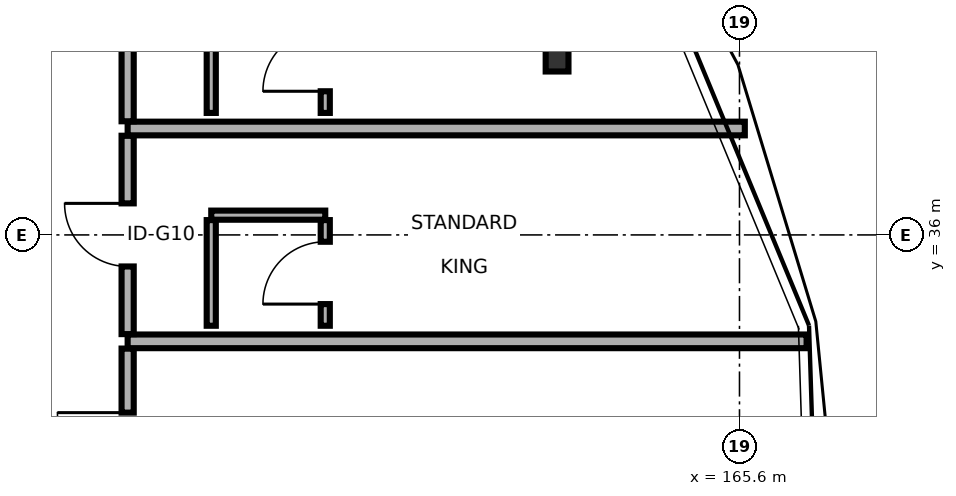
"""IFC4 building model, lengths in metres.
Left out: names, types, materials, properties, quantities, classifications, styles, units other than length and angle.
Written with IfcOpenShell. Run it as: python <this file> out.ifc"""

import sys

from ifc_helpers import new_model, si_unit, direction, frame, frame_2d, origin, origin_2d, place, context, subcontext, project, spatial, rectangle, i_section, extrude, element, fill, save


model = new_model("IFC4")
c1 = context("Model", 3, precision=1e-05, world=origin(), true_north=direction((0.0, 1.0)))
c2 = subcontext(c1, "Body", "Model", "MODEL_VIEW")
j1 = project(units=[si_unit("LENGTHUNIT", "METRE"), si_unit("PLANEANGLEUNIT", "RADIAN")], contexts=[c1])
p1 = place(None, origin())
s1 = spatial("IfcSite", under=j1, at=p1, CompositionType="ELEMENT")
p2 = place(p1, origin())
s2 = spatial("IfcBuilding", under=s1, at=p2, CompositionType="ELEMENT")
p3 = place(p2, frame((0.0, 0.0, 24.9)))
s3 = spatial("IfcBuildingStorey", under=s2, at=p3, CompositionType="ELEMENT", Elevation=24.9)
p4 = place(p3, frame((163.2, 38.4, 0.0), z_axis=(0.0, 0.0, 1.0), x_axis=(1.0, 0.0, 0.0)))
e1 = element("IfcColumn", 1, at=p4, inside=s3, PredefinedType="COLUMN", context=c2, shape_type="SweptSolid", body=[
    extrude(i_section(OverallWidth=0.3, OverallDepth=0.5, WebThickness=0.014, FlangeThickness=0.028, FilletRadius=0.027, at=origin_2d()), origin(), (0.0, 0.0, 1.0), 3.4),
])
p5 = place(p3, frame((157.55, 31.895, 0.0), z_axis=(0.0, 0.0, 1.0), x_axis=(0.0, 1.0, 0.0)))
e2 = element("IfcWall", 2, at=p5, inside=s3, PredefinedType="PARTITIONING", context=c2, shape_type="SweptSolid", body=[
    extrude(rectangle(XDim=2.61, YDim=0.16, at=frame_2d((1.305, 0.0))), origin(), (0.0, 0.0, 1.0), 3.19),
])
p6 = place(p5, frame((0.843, 0.0, 0.0)))
e3 = element("IfcOpeningElement", 3, at=p6, cuts=e2, PredefinedType="OPENING", context=c2, shape_type="SweptSolid", body=[
    extrude(rectangle(XDim=0.924, YDim=2.16, at=frame_2d((0.462, 1.08))), frame((0.0, 0.09, 0.0), z_axis=(0.0, -1.0, 0.0), x_axis=(1.0, 0.0, 0.0)), (0.0, 0.0, 1.0), 0.18),
])
p7 = place(p3, frame((157.55, 34.6, 0.0), z_axis=(0.0, 0.0, 1.0), x_axis=(1.0, 0.0, 0.0)))
e4 = element("IfcWall", 4, at=p7, inside=s3, PredefinedType="PARTITIONING", context=c2, shape_type="SweptSolid", body=[
    extrude(rectangle(XDim=8.933, YDim=0.18, at=frame_2d((4.466, 0.0))), origin(), (0.0, 0.0, 1.0), 2.675),
])
p8 = place(p3, frame((157.55, 34.695, 0.0), z_axis=(0.0, 0.0, 1.0), x_axis=(0.0, 1.0, 0.0)))
e5 = element("IfcWall", 5, at=p8, inside=s3, PredefinedType="PARTITIONING", context=c2, shape_type="SweptSolid", body=[
    extrude(rectangle(XDim=2.61, YDim=0.16, at=frame_2d((1.305, 0.0))), origin(), (0.0, 0.0, 1.0), 3.19),
])
p9 = place(p8, frame((0.89, 0.0, 0.0)))
e6 = element("IfcOpeningElement", 6, at=p9, cuts=e5, PredefinedType="OPENING", context=c2, shape_type="SweptSolid", body=[
    extrude(rectangle(XDim=0.83, YDim=2.11, at=frame_2d((0.415, 1.055))), frame((0.0, 0.09, 0.0), z_axis=(0.0, -1.0, 0.0), x_axis=(1.0, 0.0, 0.0)), (0.0, 0.0, 1.0), 0.18),
])
p10 = place(p3, frame((158.65, 36.26, 0.0), z_axis=(0.0, 0.0, 1.0), x_axis=(1.0, 0.0, 0.0)))
e7 = element("IfcWall", 7, at=p10, inside=s3, PredefinedType="PARTITIONING", context=c2, shape_type="SweptSolid", body=[
    extrude(rectangle(XDim=1.5, YDim=0.12, at=frame_2d((0.75, 0.0))), origin(), (0.0, 0.0, 1.0), 3.19),
])
p11 = place(p3, frame((158.65, 34.805, 0.0), z_axis=(0.0, 0.0, 1.0), x_axis=(0.0, 1.0, 0.0)))
e8 = element("IfcWall", 8, at=p11, inside=s3, PredefinedType="PARTITIONING", context=c2, shape_type="SweptSolid", body=[
    extrude(rectangle(XDim=1.39, YDim=0.12, at=frame_2d((0.695, 0.0))), origin(), (0.0, 0.0, 1.0), 3.19),
])
p12 = place(p3, frame((160.15, 34.805, 0.0), z_axis=(0.0, 0.0, 1.0), x_axis=(0.0, 1.0, 0.0)))
e9 = element("IfcWall", 9, at=p12, inside=s3, PredefinedType="PARTITIONING", context=c2, shape_type="SweptSolid", body=[
    extrude(rectangle(XDim=1.39, YDim=0.12, at=frame_2d((0.695, 0.0))), origin(), (0.0, 0.0, 1.0), 3.19),
])
p13 = place(p12, frame((0.285, 0.0, 0.0)))
e10 = element("IfcOpeningElement", 10, at=p13, cuts=e9, PredefinedType="OPENING", context=c2, shape_type="SweptSolid", body=[
    extrude(rectangle(XDim=0.82, YDim=2.08, at=frame_2d((0.41, 1.04))), frame((0.0, 0.07, 0.0), z_axis=(0.0, -1.0, 0.0), x_axis=(1.0, 0.0, 0.0)), (0.0, 0.0, 1.0), 0.14),
])
p14 = place(p3, frame((157.55, 37.4, 0.0), z_axis=(0.0, 0.0, 1.0), x_axis=(1.0, 0.0, 0.0)))
e11 = element("IfcWall", 11, at=p14, inside=s3, PredefinedType="PARTITIONING", context=c2, shape_type="SweptSolid", body=[
    extrude(rectangle(XDim=8.12, YDim=0.18, at=frame_2d((4.06, 0.0))), origin(), (0.0, 0.0, 1.0), 2.675),
])
p15 = place(p3, frame((157.55, 37.495, 0.0), z_axis=(0.0, 0.0, 1.0), x_axis=(0.0, 1.0, 0.0)))
e12 = element("IfcWall", 12, at=p15, inside=s3, PredefinedType="PARTITIONING", context=c2, shape_type="SweptSolid", body=[
    extrude(rectangle(XDim=2.61, YDim=0.16, at=frame_2d((1.305, 0.0))), origin(), (0.0, 0.0, 1.0), 2.725),
])
p16 = place(p15, frame((1.595, 0.0, 0.0)))
e13 = element("IfcOpeningElement", 13, at=p16, cuts=e12, PredefinedType="OPENING", context=c2, shape_type="SweptSolid", body=[
    extrude(rectangle(XDim=0.855, YDim=2.11, at=frame_2d((0.427, 1.055))), frame((0.0, 0.09, 0.0), z_axis=(0.0, -1.0, 0.0), x_axis=(1.0, 0.0, 0.0)), (0.0, 0.0, 1.0), 0.18),
])
p17 = place(p3, frame((158.65, 37.605, 0.0), z_axis=(0.0, 0.0, 1.0), x_axis=(0.0, 1.0, 0.0)))
e14 = element("IfcWall", 14, at=p17, inside=s3, PredefinedType="PARTITIONING", context=c2, shape_type="SweptSolid", body=[
    extrude(rectangle(XDim=1.39, YDim=0.12, at=frame_2d((0.695, 0.0))), origin(), (0.0, 0.0, 1.0), 2.725),
])
p18 = place(p3, frame((160.15, 37.605, 0.0), z_axis=(0.0, 0.0, 1.0), x_axis=(0.0, 1.0, 0.0)))
e15 = element("IfcWall", 15, at=p18, inside=s3, PredefinedType="PARTITIONING", context=c2, shape_type="SweptSolid", body=[
    extrude(rectangle(XDim=1.39, YDim=0.12, at=frame_2d((0.695, 0.0))), origin(), (0.0, 0.0, 1.0), 2.725),
])
p19 = place(p18, frame((0.285, 0.0, 0.0)))
e16 = element("IfcOpeningElement", 16, at=p19, cuts=e15, PredefinedType="OPENING", context=c2, shape_type="SweptSolid", body=[
    extrude(rectangle(XDim=0.82, YDim=2.08, at=frame_2d((0.41, 1.04))), frame((0.0, 0.07, 0.0), z_axis=(0.0, -1.0, 0.0), x_axis=(1.0, 0.0, 0.0)), (0.0, 0.0, 1.0), 0.14),
])
p20 = place(p6, origin())
e17 = element("IfcDoor", 17, at=p20, inside=s3, OperationType="SINGLE_SWING_RIGHT", PredefinedType="DOOR", context=c2, shape_type="SweptSolid", body=[
    extrude(rectangle(XDim=0.924, YDim=2.16, at=frame_2d((0.462, 1.08))), frame((0.0, 0.025, 0.0), z_axis=(0.0, -1.0, 0.0), x_axis=(1.0, 0.0, 0.0)), (0.0, 0.0, 1.0), 0.05),
])
fill(e3, e17)
p21 = place(p9, origin())
e18 = element("IfcDoor", 18, at=p21, inside=s3, OperationType="SINGLE_SWING_RIGHT", PredefinedType="DOOR", context=c2, shape_type="SweptSolid", body=[
    extrude(rectangle(XDim=0.83, YDim=2.11, at=frame_2d((0.415, 1.055))), frame((0.0, 0.025, 0.0), z_axis=(0.0, -1.0, 0.0), x_axis=(1.0, 0.0, 0.0)), (0.0, 0.0, 1.0), 0.05),
])
fill(e6, e18)
p22 = place(p13, origin())
e19 = element("IfcDoor", 19, at=p22, inside=s3, OperationType="SINGLE_SWING_LEFT", PredefinedType="DOOR", context=c2, shape_type="SweptSolid", body=[
    extrude(rectangle(XDim=0.82, YDim=2.08, at=frame_2d((0.41, 1.04))), frame((0.0, 0.025, 0.0), z_axis=(0.0, -1.0, 0.0), x_axis=(1.0, 0.0, 0.0)), (0.0, 0.0, 1.0), 0.05),
])
fill(e10, e19)
p23 = place(p19, origin())
e20 = element("IfcDoor", 20, at=p23, inside=s3, OperationType="SINGLE_SWING_LEFT", PredefinedType="DOOR", context=c2, shape_type="SweptSolid", body=[
    extrude(rectangle(XDim=0.82, YDim=2.08, at=frame_2d((0.41, 1.04))), frame((0.0, 0.025, 0.0), z_axis=(0.0, -1.0, 0.0), x_axis=(1.0, 0.0, 0.0)), (0.0, 0.0, 1.0), 0.05),
])
fill(e16, e20)
save(model, sys.argv[1])
